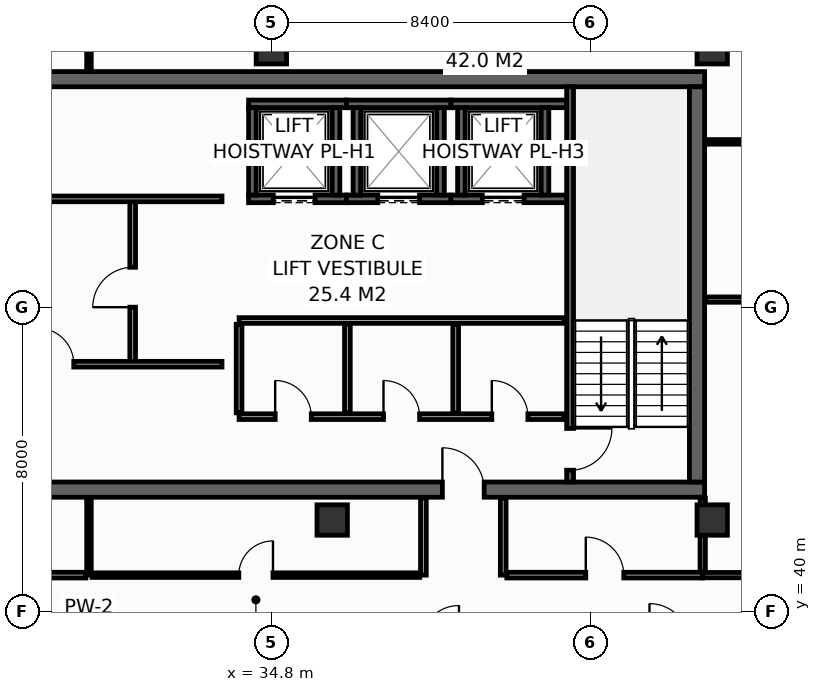
"""IFC4 building model, lengths in metres.
Left out: names, types, materials, properties, quantities, classifications, styles, units other than length and angle.
Written with IfcOpenShell. Run it as: python <this file> out.ifc"""

import sys

from ifc_helpers import new_model, si_unit, direction, frame, frame_2d, origin, origin_2d, place, context, subcontext, project, spatial, rectangle, hollow_rectangle, extrude, element, fill, save


model = new_model("IFC4")
c1 = context("Model", 3, precision=1e-05, world=origin(), true_north=direction((0.0, 1.0)))
c2 = subcontext(c1, "Body", "Model", "MODEL_VIEW")
j1 = project(units=[si_unit("LENGTHUNIT", "METRE"), si_unit("PLANEANGLEUNIT", "RADIAN")], contexts=[c1])
p1 = place(None, origin())
s1 = spatial("IfcSite", under=j1, at=p1, CompositionType="ELEMENT")
p2 = place(p1, origin())
s2 = spatial("IfcBuilding", under=s1, at=p2, CompositionType="ELEMENT")
p3 = place(p2, frame((0.0, 0.0, 238.2)))
s3 = spatial("IfcBuildingStorey", under=s2, at=p3, CompositionType="ELEMENT", Elevation=238.2)
p4 = place(p3, frame((13.7, 43.2, 0.0), z_axis=(0.0, 0.0, 1.0), x_axis=(1.0, 0.0, 0.0)))
e1 = element("IfcWall", 1, at=p4, inside=s3, PredefinedType="SHEAR", context=c2, shape_type="SweptSolid", body=[
    extrude(rectangle(XDim=32.5, YDim=0.4, at=frame_2d((16.25, 0.0))), origin(), (0.0, 0.0, 1.0), 3.55),
])
p5 = place(p4, frame((5.4, 0.0, 0.0)))
e2 = element("IfcOpeningElement", 2, at=p5, cuts=e1, PredefinedType="OPENING", context=c2, shape_type="SweptSolid", body=[
    extrude(rectangle(XDim=1.1, YDim=2.15, at=frame_2d((0.55, 1.075))), frame((0.0, 0.21, 0.0), z_axis=(0.0, -1.0, 0.0), x_axis=(1.0, 0.0, 0.0)), (0.0, 0.0, 1.0), 0.42),
])
p6 = place(p4, frame((25.6, 0.0, 0.0)))
e3 = element("IfcOpeningElement", 3, at=p6, cuts=e1, PredefinedType="OPENING", context=c2, shape_type="SweptSolid", body=[
    extrude(rectangle(XDim=1.1, YDim=2.15, at=frame_2d((0.55, 1.075))), frame((0.0, 0.21, 0.0), z_axis=(0.0, -1.0, 0.0), x_axis=(1.0, 0.0, 0.0)), (0.0, 0.0, 1.0), 0.42),
])
p7 = place(p3, frame((13.7, 54.0, 0.0), z_axis=(0.0, 0.0, 1.0), x_axis=(1.0, 0.0, 0.0)))
e4 = element("IfcWall", 4, at=p7, inside=s3, PredefinedType="SHEAR", context=c2, shape_type="SweptSolid", body=[
    extrude(rectangle(XDim=32.5, YDim=0.4, at=frame_2d((16.25, 0.0))), origin(), (0.0, 0.0, 1.0), 3.55),
])
p8 = place(p3, frame((46.0, 43.4, 0.0), z_axis=(0.0, 0.0, 1.0), x_axis=(0.0, 1.0, 0.0)))
e5 = element("IfcWall", 5, at=p8, inside=s3, PredefinedType="SHEAR", context=c2, shape_type="SweptSolid", body=[
    extrude(rectangle(XDim=10.4, YDim=0.4, at=frame_2d((5.2, 0.0))), origin(), (0.0, 0.0, 1.0), 3.55),
])
for number, where, z_axis, x_axis in (
    (6, (34.8, 54.8, 0.0), (0.0, 0.0, 1.0), (1.0, 0.0, 0.0)),
    (7, (46.4, 54.8, 0.0), (0.0, 0.0, 1.0), (1.0, 0.0, 0.0)),
    (8, (36.4, 42.4, 0.0), (0.0, 0.0, 1.0), (1.0, 0.0, 0.0)),
    (9, (46.4, 42.4, 0.0), (0.0, 0.0, 1.0), (1.0, 0.0, 0.0)),
):
    element("IfcColumn", number, at=place(p3, frame(where, z_axis=z_axis, x_axis=x_axis)), inside=s3, PredefinedType="COLUMN", context=c2, shape_type="SweptSolid", body=[
        extrude(hollow_rectangle(XDim=0.8, YDim=0.8, WallThickness=0.036, at=origin_2d()), origin(), (0.0, 0.0, 1.0), 3.8),
    ])
p9 = place(p3, frame((34.2, 50.85, 0.0), z_axis=(0.0, 0.0, 1.0), x_axis=(1.0, 0.0, 0.0)))
e10 = element("IfcWall", 10, at=p9, inside=s3, PredefinedType="SHEAR", context=c2, shape_type="SweptSolid", body=[
    extrude(rectangle(XDim=2.575, YDim=0.2, at=frame_2d((1.288, 0.0))), origin(), (0.0, 0.0, 1.0), 3.55),
])
p10 = place(p9, frame((0.65, 0.0, 0.0)))
e11 = element("IfcOpeningElement", 11, at=p10, cuts=e10, PredefinedType="OPENING", context=c2, shape_type="SweptSolid", body=[
    extrude(rectangle(XDim=1.1, YDim=2.2, at=frame_2d((0.55, 1.1))), frame((0.0, 0.11, 0.0), z_axis=(0.0, -1.0, 0.0), x_axis=(1.0, 0.0, 0.0)), (0.0, 0.0, 1.0), 0.22),
])
p11 = place(p3, frame((34.2, 53.35, 0.0), z_axis=(0.0, 0.0, 1.0), x_axis=(1.0, 0.0, 0.0)))
e12 = element("IfcWall", 12, at=p11, inside=s3, PredefinedType="SHEAR", context=c2, shape_type="SweptSolid", body=[
    extrude(rectangle(XDim=2.575, YDim=0.2, at=frame_2d((1.288, 0.0))), origin(), (0.0, 0.0, 1.0), 3.55),
])
for number, where, z_axis, x_axis in (
    (13, (34.3, 50.95, 0.0), (0.0, 0.0, 1.0), (0.0, 1.0, 0.0)),
    (14, (36.5, 50.95, 0.0), (0.0, 0.0, 1.0), (0.0, 1.0, 0.0)),
):
    element("IfcWall", number, at=place(p3, frame(where, z_axis=z_axis, x_axis=x_axis)), inside=s3, PredefinedType="SHEAR", context=c2, shape_type="SweptSolid", body=[
        extrude(rectangle(XDim=2.3, YDim=0.2, at=frame_2d((1.15, 0.0))), origin(), (0.0, 0.0, 1.0), 3.55),
    ])
p12 = place(p3, frame((36.775, 50.85, 0.0), z_axis=(0.0, 0.0, 1.0), x_axis=(1.0, 0.0, 0.0)))
e15 = element("IfcWall", 15, at=p12, inside=s3, PredefinedType="SHEAR", context=c2, shape_type="SweptSolid", body=[
    extrude(rectangle(XDim=2.75, YDim=0.2, at=frame_2d((1.375, 0.0))), origin(), (0.0, 0.0, 1.0), 3.55),
])
p13 = place(p12, frame((0.825, 0.0, 0.0)))
e16 = element("IfcOpeningElement", 16, at=p13, cuts=e15, PredefinedType="OPENING", context=c2, shape_type="SweptSolid", body=[
    extrude(rectangle(XDim=1.1, YDim=2.2, at=frame_2d((0.55, 1.1))), frame((0.0, 0.11, 0.0), z_axis=(0.0, -1.0, 0.0), x_axis=(1.0, 0.0, 0.0)), (0.0, 0.0, 1.0), 0.22),
])
p14 = place(p3, frame((36.775, 53.35, 0.0), z_axis=(0.0, 0.0, 1.0), x_axis=(1.0, 0.0, 0.0)))
e17 = element("IfcWall", 17, at=p14, inside=s3, PredefinedType="SHEAR", context=c2, shape_type="SweptSolid", body=[
    extrude(rectangle(XDim=2.75, YDim=0.2, at=frame_2d((1.375, 0.0))), origin(), (0.0, 0.0, 1.0), 3.55),
])
for number, where, z_axis, x_axis in (
    (18, (37.05, 50.95, 0.0), (0.0, 0.0, 1.0), (0.0, 1.0, 0.0)),
    (19, (39.25, 50.95, 0.0), (0.0, 0.0, 1.0), (0.0, 1.0, 0.0)),
):
    element("IfcWall", number, at=place(p3, frame(where, z_axis=z_axis, x_axis=x_axis)), inside=s3, PredefinedType="SHEAR", context=c2, shape_type="SweptSolid", body=[
        extrude(rectangle(XDim=2.3, YDim=0.2, at=frame_2d((1.15, 0.0))), origin(), (0.0, 0.0, 1.0), 3.55),
    ])
p15 = place(p3, frame((39.525, 50.85, 0.0), z_axis=(0.0, 0.0, 1.0), x_axis=(1.0, 0.0, 0.0)))
e20 = element("IfcWall", 20, at=p15, inside=s3, PredefinedType="SHEAR", context=c2, shape_type="SweptSolid", body=[
    extrude(rectangle(XDim=3.045, YDim=0.2, at=frame_2d((1.522, 0.0))), origin(), (0.0, 0.0, 1.0), 3.55),
])
p16 = place(p15, frame((0.825, 0.0, 0.0)))
e21 = element("IfcOpeningElement", 21, at=p16, cuts=e20, PredefinedType="OPENING", context=c2, shape_type="SweptSolid", body=[
    extrude(rectangle(XDim=1.1, YDim=2.2, at=frame_2d((0.55, 1.1))), frame((0.0, 0.11, 0.0), z_axis=(0.0, -1.0, 0.0), x_axis=(1.0, 0.0, 0.0)), (0.0, 0.0, 1.0), 0.22),
])
p17 = place(p3, frame((39.525, 53.35, 0.0), z_axis=(0.0, 0.0, 1.0), x_axis=(1.0, 0.0, 0.0)))
e22 = element("IfcWall", 22, at=p17, inside=s3, PredefinedType="SHEAR", context=c2, shape_type="SweptSolid", body=[
    extrude(rectangle(XDim=3.045, YDim=0.2, at=frame_2d((1.522, 0.0))), origin(), (0.0, 0.0, 1.0), 3.55),
])
for number, where, z_axis, x_axis in (
    (23, (39.8, 50.95, 0.0), (0.0, 0.0, 1.0), (0.0, 1.0, 0.0)),
    (24, (42.0, 50.95, 0.0), (0.0, 0.0, 1.0), (0.0, 1.0, 0.0)),
):
    element("IfcWall", number, at=place(p3, frame(where, z_axis=z_axis, x_axis=x_axis)), inside=s3, PredefinedType="SHEAR", context=c2, shape_type="SweptSolid", body=[
        extrude(rectangle(XDim=2.3, YDim=0.2, at=frame_2d((1.15, 0.0))), origin(), (0.0, 0.0, 1.0), 3.55),
    ])
p18 = place(p3, frame((42.66, 53.8, 0.0), z_axis=(0.0, 0.0, 1.0), x_axis=(0.0, -1.0, 0.0)))
e25 = element("IfcWall", 25, at=p18, inside=s3, PredefinedType="SHEAR", context=c2, shape_type="SweptSolid", body=[
    extrude(rectangle(XDim=10.4, YDim=0.18, at=frame_2d((5.2, 0.0))), origin(), (0.0, 0.0, 1.0), 3.55),
])
p19 = place(p18, frame((8.99, 0.0, 0.0)))
e26 = element("IfcOpeningElement", 26, at=p19, cuts=e25, PredefinedType="OPENING", context=c2, shape_type="SweptSolid", body=[
    extrude(rectangle(XDim=1.1, YDim=2.15, at=frame_2d((0.55, 1.075))), frame((0.0, 0.1, 0.0), z_axis=(0.0, -1.0, 0.0), x_axis=(1.0, 0.0, 0.0)), (0.0, 0.0, 1.0), 0.2),
])
p20 = place(p3, frame((31.15, 46.5, 0.0), z_axis=(0.0, 0.0, 1.0), x_axis=(0.0, 1.0, 0.0)))
e27 = element("IfcWall", 27, at=p20, inside=s3, PredefinedType="PARTITIONING", context=c2, shape_type="SweptSolid", body=[
    extrude(rectangle(XDim=4.35, YDim=0.15, at=frame_2d((2.175, 0.0))), origin(), (0.0, 0.0, 1.0), 3.55),
])
p21 = place(p20, frame((1.5, 0.0, 0.0)))
e28 = element("IfcOpeningElement", 28, at=p21, cuts=e27, PredefinedType="OPENING", context=c2, shape_type="SweptSolid", body=[
    extrude(rectangle(XDim=1.05, YDim=2.15, at=frame_2d((0.525, 1.075))), frame((0.0, 0.085, 0.0), z_axis=(0.0, -1.0, 0.0), x_axis=(1.0, 0.0, 0.0)), (0.0, 0.0, 1.0), 0.17),
])
p22 = place(p3, frame((33.95, 45.12, 0.0), z_axis=(0.0, 0.0, 1.0), x_axis=(1.0, 0.0, 0.0)))
e29 = element("IfcWall", 29, at=p22, inside=s3, PredefinedType="PARTITIONING", context=c2, shape_type="SweptSolid", body=[
    extrude(rectangle(XDim=8.55, YDim=0.15, at=frame_2d((4.275, 0.0))), origin(), (0.0, 0.0, 1.0), 3.55),
])
p23 = place(p22, frame((0.95, 0.0, 0.0)))
e30 = element("IfcOpeningElement", 30, at=p23, cuts=e29, PredefinedType="OPENING", context=c2, shape_type="SweptSolid", body=[
    extrude(rectangle(XDim=0.95, YDim=2.15, at=frame_2d((0.475, 1.075))), frame((0.0, 0.085, 0.0), z_axis=(0.0, -1.0, 0.0), x_axis=(1.0, 0.0, 0.0)), (0.0, 0.0, 1.0), 0.17),
])
p24 = place(p22, frame((3.8, 0.0, 0.0)))
e31 = element("IfcOpeningElement", 31, at=p24, cuts=e29, PredefinedType="OPENING", context=c2, shape_type="SweptSolid", body=[
    extrude(rectangle(XDim=0.95, YDim=2.15, at=frame_2d((0.475, 1.075))), frame((0.0, 0.085, 0.0), z_axis=(0.0, -1.0, 0.0), x_axis=(1.0, 0.0, 0.0)), (0.0, 0.0, 1.0), 0.17),
])
p25 = place(p22, frame((6.65, 0.0, 0.0)))
e32 = element("IfcOpeningElement", 32, at=p25, cuts=e29, PredefinedType="OPENING", context=c2, shape_type="SweptSolid", body=[
    extrude(rectangle(XDim=0.95, YDim=2.15, at=frame_2d((0.475, 1.075))), frame((0.0, 0.085, 0.0), z_axis=(0.0, -1.0, 0.0), x_axis=(1.0, 0.0, 0.0)), (0.0, 0.0, 1.0), 0.17),
])
p26 = place(p3, frame((33.95, 47.65, 0.0), z_axis=(0.0, 0.0, 1.0), x_axis=(1.0, 0.0, 0.0)))
e33 = element("IfcWall", 33, at=p26, inside=s3, PredefinedType="PARTITIONING", context=c2, shape_type="SweptSolid", body=[
    extrude(rectangle(XDim=8.55, YDim=0.15, at=frame_2d((4.275, 0.0))), origin(), (0.0, 0.0, 1.0), 3.55),
])
for number, where, z_axis, x_axis in (
    (34, (33.95, 45.22, 0.0), (0.0, 0.0, 1.0), (0.0, 1.0, 0.0)),
    (35, (36.8, 45.22, 0.0), (0.0, 0.0, 1.0), (0.0, 1.0, 0.0)),
    (36, (39.65, 45.22, 0.0), (0.0, 0.0, 1.0), (0.0, 1.0, 0.0)),
):
    element("IfcWall", number, at=place(p3, frame(where, z_axis=z_axis, x_axis=x_axis)), inside=s3, PredefinedType="PARTITIONING", context=c2, shape_type="SweptSolid", body=[
        extrude(rectangle(XDim=2.33, YDim=0.15, at=frame_2d((1.165, 0.0))), origin(), (0.0, 0.0, 1.0), 3.55),
    ])
p27 = place(p3, frame((25.85, 50.85, 0.0), z_axis=(0.0, 0.0, 1.0), x_axis=(1.0, 0.0, 0.0)))
e37 = element("IfcWall", 37, at=p27, inside=s3, PredefinedType="PARTITIONING", context=c2, shape_type="SweptSolid", body=[
    extrude(rectangle(XDim=7.65, YDim=0.15, at=frame_2d((3.825, 0.0))), origin(), (0.0, 0.0, 1.0), 3.55),
])
p28 = place(p27, frame((1.25, 0.0, 0.0)))
e38 = element("IfcOpeningElement", 38, at=p28, cuts=e37, PredefinedType="OPENING", context=c2, shape_type="SweptSolid", body=[
    extrude(rectangle(XDim=0.95, YDim=2.15, at=frame_2d((0.475, 1.075))), frame((0.0, 0.085, 0.0), z_axis=(0.0, -1.0, 0.0), x_axis=(1.0, 0.0, 0.0)), (0.0, 0.0, 1.0), 0.17),
])
p29 = place(p3, frame((25.85, 46.5, 0.0), z_axis=(0.0, 0.0, 1.0), x_axis=(1.0, 0.0, 0.0)))
e39 = element("IfcWall", 39, at=p29, inside=s3, PredefinedType="PARTITIONING", context=c2, shape_type="SweptSolid", body=[
    extrude(rectangle(XDim=7.65, YDim=0.15, at=frame_2d((3.825, 0.0))), origin(), (0.0, 0.0, 1.0), 3.55),
])
p30 = place(p29, frame((2.8, 0.0, 0.0)))
e40 = element("IfcOpeningElement", 40, at=p30, cuts=e39, PredefinedType="OPENING", context=c2, shape_type="SweptSolid", body=[
    extrude(rectangle(XDim=0.95, YDim=2.15, at=frame_2d((0.475, 1.075))), frame((0.0, 0.085, 0.0), z_axis=(0.0, -1.0, 0.0), x_axis=(1.0, 0.0, 0.0)), (0.0, 0.0, 1.0), 0.17),
])
p31 = place(p3, frame((46.15, 40.95, 0.0), z_axis=(0.0, 0.0, 1.0), x_axis=(1.0, 0.0, 0.0)))
e41 = element("IfcWall", 41, at=p31, inside=s3, PredefinedType="PARTITIONING", context=c2, shape_type="SweptSolid", body=[
    extrude(rectangle(XDim=4.05, YDim=0.14, at=frame_2d((2.025, 0.0))), origin(), (0.0, 0.0, 1.0), 3.55),
])
p32 = place(p3, frame((46.15, 41.04, 0.0), z_axis=(0.0, 0.0, 1.0), x_axis=(0.0, 1.0, 0.0)))
e42 = element("IfcWall", 42, at=p32, inside=s3, PredefinedType="PARTITIONING", context=c2, shape_type="SweptSolid", body=[
    extrude(rectangle(XDim=1.94, YDim=0.14, at=frame_2d((0.97, 0.0))), origin(), (0.0, 0.0, 1.0), 3.55),
])
p33 = place(p3, frame((46.22, 48.2, 0.0), z_axis=(0.0, 0.0, 1.0), x_axis=(1.0, 0.0, 0.0)))
e43 = element("IfcWall", 43, at=p33, inside=s3, PredefinedType="PARTITIONING", context=c2, shape_type="SweptSolid", body=[
    extrude(rectangle(XDim=3.98, YDim=0.14, at=frame_2d((1.99, 0.0))), origin(), (0.0, 0.0, 1.0), 3.55),
])
p34 = place(p3, frame((46.22, 52.35, 0.0), z_axis=(0.0, 0.0, 1.0), x_axis=(1.0, 0.0, 0.0)))
e44 = element("IfcWall", 44, at=p34, inside=s3, PredefinedType="PARTITIONING", context=c2, shape_type="SweptSolid", body=[
    extrude(rectangle(XDim=3.98, YDim=0.12, at=frame_2d((1.99, 0.0))), origin(), (0.0, 0.0, 1.0), 3.55),
])
p35 = place(p3, frame((30.0, 54.22, 0.0), z_axis=(0.0, 0.0, 1.0), x_axis=(0.0, 1.0, 0.0)))
e45 = element("IfcWall", 45, at=p35, inside=s3, PredefinedType="PARTITIONING", context=c2, shape_type="SweptSolid", body=[
    extrude(rectangle(XDim=1.775, YDim=0.12, at=frame_2d((0.888, 0.0))), origin(), (0.0, 0.0, 1.0), 2.935),
])
for number, where, z_axis, x_axis in (
    (46, (38.8, 40.95, 0.0), (0.0, 0.0, 1.0), (0.0, 1.0, 0.0)),
    (47, (40.9, 40.95, 0.0), (0.0, 0.0, 1.0), (0.0, 1.0, 0.0)),
):
    element("IfcWall", number, at=place(p3, frame(where, z_axis=z_axis, x_axis=x_axis)), inside=s3, PredefinedType="PARTITIONING", context=c2, shape_type="SweptSolid", body=[
        extrude(rectangle(XDim=2.03, YDim=0.15, at=frame_2d((1.015, 0.0))), origin(), (0.0, 0.0, 1.0), 3.55),
    ])
p36 = place(p3, frame((30.0, 40.95, 0.0), z_axis=(0.0, 0.0, 1.0), x_axis=(0.0, 1.0, 0.0)))
e48 = element("IfcWall", 48, at=p36, inside=s3, PredefinedType="PARTITIONING", context=c2, shape_type="SweptSolid", body=[
    extrude(rectangle(XDim=2.03, YDim=0.12, at=frame_2d((1.015, 0.0))), origin(), (0.0, 0.0, 1.0), 2.947),
])
p37 = place(p3, frame((20.795, 40.95, 0.0), z_axis=(0.0, 0.0, 1.0), x_axis=(1.0, 0.0, 0.0)))
e49 = element("IfcWall", 49, at=p37, inside=s3, PredefinedType="PARTITIONING", context=c2, shape_type="SweptSolid", body=[
    extrude(rectangle(XDim=9.125, YDim=0.15, at=frame_2d((4.562, 0.0))), origin(), (0.0, 0.0, 1.0), 2.947),
])
p38 = place(p37, frame((4.062, 0.0, 0.0)))
e50 = element("IfcOpeningElement", 50, at=p38, cuts=e49, PredefinedType="OPENING", context=c2, shape_type="SweptSolid", body=[
    extrude(rectangle(XDim=1.0, YDim=2.15, at=frame_2d((0.5, 1.075))), frame((0.0, 0.085, 0.0), z_axis=(0.0, -1.0, 0.0), x_axis=(1.0, 0.0, 0.0)), (0.0, 0.0, 1.0), 0.17),
])
p39 = place(p3, frame((30.08, 40.95, 0.0), z_axis=(0.0, 0.0, 1.0), x_axis=(1.0, 0.0, 0.0)))
e51 = element("IfcWall", 51, at=p39, inside=s3, PredefinedType="PARTITIONING", context=c2, shape_type="SweptSolid", body=[
    extrude(rectangle(XDim=8.625, YDim=0.12, at=frame_2d((4.312, 0.0))), origin(), (0.0, 0.0, 1.0), 2.947),
])
p40 = place(p39, frame((3.862, 0.0, 0.0)))
e52 = element("IfcOpeningElement", 52, at=p40, cuts=e51, PredefinedType="OPENING", context=c2, shape_type="SweptSolid", body=[
    extrude(rectangle(XDim=0.9, YDim=2.1, at=frame_2d((0.45, 1.05))), frame((0.0, 0.07, 0.0), z_axis=(0.0, -1.0, 0.0), x_axis=(1.0, 0.0, 0.0)), (0.0, 0.0, 1.0), 0.14),
])
p41 = place(p3, frame((40.995, 40.95, 0.0), z_axis=(0.0, 0.0, 1.0), x_axis=(1.0, 0.0, 0.0)))
e53 = element("IfcWall", 53, at=p41, inside=s3, PredefinedType="PARTITIONING", context=c2, shape_type="SweptSolid", body=[
    extrude(rectangle(XDim=5.155, YDim=0.15, at=frame_2d((2.577, 0.0))), origin(), (0.0, 0.0, 1.0), 3.55),
])
p42 = place(p41, frame((2.078, 0.0, 0.0)))
e54 = element("IfcOpeningElement", 54, at=p42, cuts=e53, PredefinedType="OPENING", context=c2, shape_type="SweptSolid", body=[
    extrude(rectangle(XDim=1.0, YDim=2.15, at=frame_2d((0.5, 1.075))), frame((0.0, 0.085, 0.0), z_axis=(0.0, -1.0, 0.0), x_axis=(1.0, 0.0, 0.0)), (0.0, 0.0, 1.0), 0.17),
])
p43 = place(p10, origin())
e55 = element("IfcDoor", 55, at=p43, inside=s3, OperationType="SLIDING_TO_LEFT", PredefinedType="DOOR", context=c2, shape_type="SweptSolid", body=[
    extrude(rectangle(XDim=1.1, YDim=2.2, at=frame_2d((0.55, 1.1))), frame((0.0, 0.025, 0.0), z_axis=(0.0, -1.0, 0.0), x_axis=(1.0, 0.0, 0.0)), (0.0, 0.0, 1.0), 0.05),
])
fill(e11, e55)
p44 = place(p13, origin())
e56 = element("IfcDoor", 56, at=p44, inside=s3, OperationType="SLIDING_TO_LEFT", PredefinedType="DOOR", context=c2, shape_type="SweptSolid", body=[
    extrude(rectangle(XDim=1.1, YDim=2.2, at=frame_2d((0.55, 1.1))), frame((0.0, 0.025, 0.0), z_axis=(0.0, -1.0, 0.0), x_axis=(1.0, 0.0, 0.0)), (0.0, 0.0, 1.0), 0.05),
])
fill(e16, e56)
p45 = place(p16, origin())
e57 = element("IfcDoor", 57, at=p45, inside=s3, OperationType="SLIDING_TO_LEFT", PredefinedType="DOOR", context=c2, shape_type="SweptSolid", body=[
    extrude(rectangle(XDim=1.1, YDim=2.2, at=frame_2d((0.55, 1.1))), frame((0.0, 0.025, 0.0), z_axis=(0.0, -1.0, 0.0), x_axis=(1.0, 0.0, 0.0)), (0.0, 0.0, 1.0), 0.05),
])
fill(e21, e57)
p46 = place(p19, origin())
e58 = element("IfcDoor", 58, at=p46, inside=s3, OperationType="SINGLE_SWING_LEFT", PredefinedType="DOOR", context=c2, shape_type="SweptSolid", body=[
    extrude(rectangle(XDim=1.1, YDim=2.15, at=frame_2d((0.55, 1.075))), frame((0.0, 0.025, 0.0), z_axis=(0.0, -1.0, 0.0), x_axis=(1.0, 0.0, 0.0)), (0.0, 0.0, 1.0), 0.05),
])
fill(e26, e58)
p47 = place(p6, origin())
e59 = element("IfcDoor", 59, at=p47, inside=s3, OperationType="SINGLE_SWING_LEFT", PredefinedType="DOOR", context=c2, shape_type="SweptSolid", body=[
    extrude(rectangle(XDim=1.1, YDim=2.15, at=frame_2d((0.55, 1.075))), frame((0.0, 0.025, 0.0), z_axis=(0.0, -1.0, 0.0), x_axis=(1.0, 0.0, 0.0)), (0.0, 0.0, 1.0), 0.05),
])
fill(e3, e59)
p48 = place(p21, origin())
e60 = element("IfcDoor", 60, at=p48, inside=s3, OperationType="SINGLE_SWING_LEFT", PredefinedType="DOOR", context=c2, shape_type="SweptSolid", body=[
    extrude(rectangle(XDim=1.05, YDim=2.15, at=frame_2d((0.525, 1.075))), frame((0.0, 0.025, 0.0), z_axis=(0.0, -1.0, 0.0), x_axis=(1.0, 0.0, 0.0)), (0.0, 0.0, 1.0), 0.05),
])
fill(e28, e60)
p49 = place(p23, origin())
e61 = element("IfcDoor", 61, at=p49, inside=s3, OperationType="SINGLE_SWING_LEFT", PredefinedType="DOOR", context=c2, shape_type="SweptSolid", body=[
    extrude(rectangle(XDim=0.95, YDim=2.15, at=frame_2d((0.475, 1.075))), frame((0.0, 0.025, 0.0), z_axis=(0.0, -1.0, 0.0), x_axis=(1.0, 0.0, 0.0)), (0.0, 0.0, 1.0), 0.05),
])
fill(e30, e61)
p50 = place(p24, origin())
e62 = element("IfcDoor", 62, at=p50, inside=s3, OperationType="SINGLE_SWING_LEFT", PredefinedType="DOOR", context=c2, shape_type="SweptSolid", body=[
    extrude(rectangle(XDim=0.95, YDim=2.15, at=frame_2d((0.475, 1.075))), frame((0.0, 0.025, 0.0), z_axis=(0.0, -1.0, 0.0), x_axis=(1.0, 0.0, 0.0)), (0.0, 0.0, 1.0), 0.05),
])
fill(e31, e62)
p51 = place(p25, origin())
e63 = element("IfcDoor", 63, at=p51, inside=s3, OperationType="SINGLE_SWING_LEFT", PredefinedType="DOOR", context=c2, shape_type="SweptSolid", body=[
    extrude(rectangle(XDim=0.95, YDim=2.15, at=frame_2d((0.475, 1.075))), frame((0.0, 0.025, 0.0), z_axis=(0.0, -1.0, 0.0), x_axis=(1.0, 0.0, 0.0)), (0.0, 0.0, 1.0), 0.05),
])
fill(e32, e63)
p52 = place(p30, origin())
e64 = element("IfcDoor", 64, at=p52, inside=s3, OperationType="SINGLE_SWING_LEFT", PredefinedType="DOOR", context=c2, shape_type="SweptSolid", body=[
    extrude(rectangle(XDim=0.95, YDim=2.15, at=frame_2d((0.475, 1.075))), frame((0.0, 0.025, 0.0), z_axis=(0.0, -1.0, 0.0), x_axis=(1.0, 0.0, 0.0)), (0.0, 0.0, 1.0), 0.05),
])
fill(e40, e64)
p53 = place(p40, origin())
e65 = element("IfcDoor", 65, at=p53, inside=s3, OperationType="SINGLE_SWING_RIGHT", PredefinedType="DOOR", context=c2, shape_type="SweptSolid", body=[
    extrude(rectangle(XDim=0.9, YDim=2.1, at=frame_2d((0.45, 1.05))), frame((0.0, 0.025, 0.0), z_axis=(0.0, -1.0, 0.0), x_axis=(1.0, 0.0, 0.0)), (0.0, 0.0, 1.0), 0.05),
])
fill(e52, e65)
p54 = place(p42, origin())
e66 = element("IfcDoor", 66, at=p54, inside=s3, OperationType="SINGLE_SWING_LEFT", PredefinedType="DOOR", context=c2, shape_type="SweptSolid", body=[
    extrude(rectangle(XDim=1.0, YDim=2.15, at=frame_2d((0.5, 1.075))), frame((0.0, 0.025, 0.0), z_axis=(0.0, -1.0, 0.0), x_axis=(1.0, 0.0, 0.0)), (0.0, 0.0, 1.0), 0.05),
])
fill(e54, e66)
save(model, sys.argv[1])
